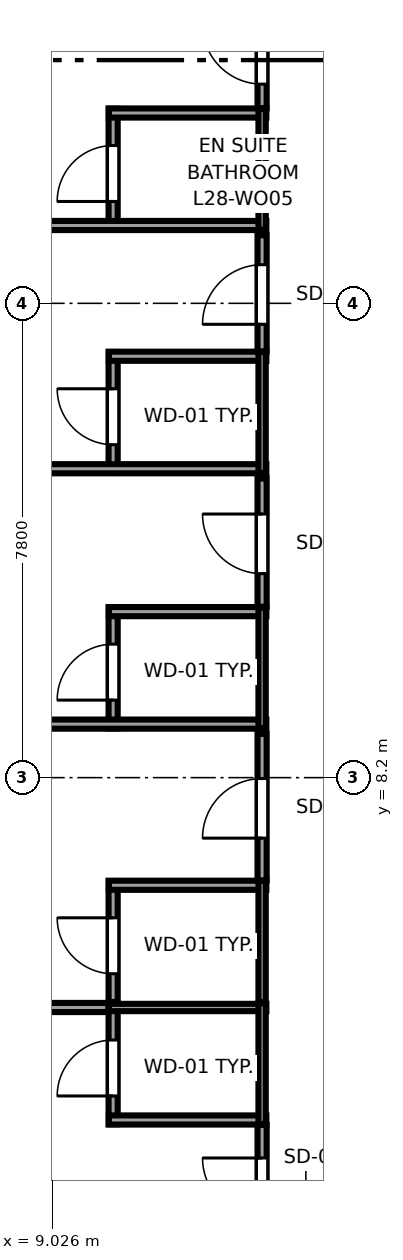
"""IFC4 building model, lengths in metres.
Left out: names, types, materials, properties, quantities, classifications, styles, units other than length and angle.
Written with IfcOpenShell. Run it as: python <this file> out.ifc"""

import sys

from ifc_helpers import new_model, si_unit, direction, frame, frame_2d, origin, place, context, subcontext, project, spatial, rectangle, extrude, source, transform, mapped, element, fill, save


model = new_model("IFC4")
c1 = context("Model", 3, precision=1e-05, world=origin(), true_north=direction((0.0, 1.0)))
c2 = subcontext(c1, "Body", "Model", "MODEL_VIEW")
j1 = project(units=[si_unit("LENGTHUNIT", "METRE"), si_unit("PLANEANGLEUNIT", "RADIAN")], contexts=[c1])
p1 = place(None, origin())
s1 = spatial("IfcSite", under=j1, at=p1, CompositionType="ELEMENT")
p2 = place(p1, origin())
s2 = spatial("IfcBuilding", under=s1, at=p2, CompositionType="ELEMENT")
p3 = place(p2, frame((0.0, 0.0, 111.55)))
s3 = spatial("IfcBuildingStorey", under=s2, at=p3, CompositionType="ELEMENT", Elevation=111.55)
p4 = place(p3, frame((10.03, 2.5, 0.0), z_axis=(0.0, 0.0, 1.0), x_axis=(0.0, 1.0, 0.0)))
e1 = element("IfcWall", 1, at=p4, inside=s3, PredefinedType="PARTITIONING", context=c2, shape_type="SweptSolid", body=[
    extrude(rectangle(XDim=1.99, YDim=0.15, at=frame_2d((0.995, 0.0))), origin(), (0.0, 0.0, 1.0), 3.37),
])
p5 = place(p4, frame((0.465, 0.0, 0.0)))
e2 = element("IfcOpeningElement", 2, at=p5, cuts=e1, PredefinedType="OPENING", context=c2, shape_type="SweptSolid", body=[
    extrude(rectangle(XDim=0.92, YDim=2.01, at=frame_2d((0.46, 1.005))), frame((0.0, 0.085, 0.0), z_axis=(0.0, -1.0, 0.0), x_axis=(1.0, 0.0, 0.0)), (0.0, 0.0, 1.0), 0.17),
])
p6 = place(p3, frame((9.96, 2.57, 0.0), z_axis=(0.0, 0.0, 1.0), x_axis=(1.0, 0.0, 0.0)))
e3 = element("IfcWall", 3, at=p6, inside=s3, PredefinedType="PARTITIONING", context=c2, shape_type="SweptSolid", body=[
    extrude(rectangle(XDim=2.59, YDim=0.15, at=frame_2d((1.295, 0.0))), origin(), (0.0, 0.0, 1.0), 3.37),
])
p7 = place(p3, frame((9.96, 4.42, 0.0), z_axis=(0.0, 0.0, 1.0), x_axis=(1.0, 0.0, 0.0)))
e4 = element("IfcWall", 4, at=p7, inside=s3, PredefinedType="PLUMBINGWALL", context=c2, shape_type="SweptSolid", body=[
    extrude(rectangle(XDim=2.59, YDim=0.12, at=frame_2d((1.295, 0.0))), origin(), (0.0, 0.0, 1.0), 3.37),
])
p8 = place(p3, frame((12.48, 2.5, 0.0), z_axis=(0.0, 0.0, 1.0), x_axis=(0.0, 1.0, 0.0)))
e5 = element("IfcWall", 5, at=p8, inside=s3, PredefinedType="PLUMBINGWALL", context=c2, shape_type="SweptSolid", body=[
    extrude(rectangle(XDim=1.99, YDim=0.12, at=frame_2d((0.995, 0.0))), origin(), (0.0, 0.0, 1.0), 3.37),
])
p9 = place(p3, frame((10.03, 4.51, 0.0), z_axis=(0.0, 0.0, 1.0), x_axis=(0.0, 1.0, 0.0)))
e6 = element("IfcWall", 6, at=p9, inside=s3, PredefinedType="PARTITIONING", context=c2, shape_type="SweptSolid", body=[
    extrude(rectangle(XDim=1.99, YDim=0.15, at=frame_2d((0.995, 0.0))), origin(), (0.0, 0.0, 1.0), 3.37),
])
p10 = place(p9, frame((0.465, 0.0, 0.0)))
e7 = element("IfcOpeningElement", 7, at=p10, cuts=e6, PredefinedType="OPENING", context=c2, shape_type="SweptSolid", body=[
    extrude(rectangle(XDim=0.92, YDim=2.01, at=frame_2d((0.46, 1.005))), frame((0.0, 0.085, 0.0), z_axis=(0.0, -1.0, 0.0), x_axis=(1.0, 0.0, 0.0)), (0.0, 0.0, 1.0), 0.17),
])
p11 = place(p3, frame((9.96, 6.43, 0.0), z_axis=(0.0, 0.0, 1.0), x_axis=(1.0, 0.0, 0.0)))
e8 = element("IfcWall", 8, at=p11, inside=s3, PredefinedType="PARTITIONING", context=c2, shape_type="SweptSolid", body=[
    extrude(rectangle(XDim=2.59, YDim=0.15, at=frame_2d((1.295, 0.0))), origin(), (0.0, 0.0, 1.0), 3.37),
])
p12 = place(p3, frame((12.48, 4.51, 0.0), z_axis=(0.0, 0.0, 1.0), x_axis=(0.0, 1.0, 0.0)))
e9 = element("IfcWall", 9, at=p12, inside=s3, PredefinedType="PLUMBINGWALL", context=c2, shape_type="SweptSolid", body=[
    extrude(rectangle(XDim=1.99, YDim=0.12, at=frame_2d((0.995, 0.0))), origin(), (0.0, 0.0, 1.0), 3.37),
])
p13 = place(p3, frame((10.03, 9.01, 0.0), z_axis=(0.0, 0.0, 1.0), x_axis=(0.0, 1.0, 0.0)))
e10 = element("IfcWall", 10, at=p13, inside=s3, PredefinedType="PARTITIONING", context=c2, shape_type="SweptSolid", body=[
    extrude(rectangle(XDim=1.99, YDim=0.15, at=frame_2d((0.995, 0.0))), origin(), (0.0, 0.0, 1.0), 3.37),
])
p14 = place(p13, frame((0.465, 0.0, 0.0)))
e11 = element("IfcOpeningElement", 11, at=p14, cuts=e10, PredefinedType="OPENING", context=c2, shape_type="SweptSolid", body=[
    extrude(rectangle(XDim=0.92, YDim=2.01, at=frame_2d((0.46, 1.005))), frame((0.0, 0.085, 0.0), z_axis=(0.0, -1.0, 0.0), x_axis=(1.0, 0.0, 0.0)), (0.0, 0.0, 1.0), 0.17),
])
p15 = place(p3, frame((0.405, 9.08, 0.0), z_axis=(0.0, 0.0, 1.0), x_axis=(1.0, 0.0, 0.0)))
e12 = element("IfcWall", 12, at=p15, inside=s3, PredefinedType="PARTITIONING", context=c2, shape_type="SweptSolid", body=[
    extrude(rectangle(XDim=12.145, YDim=0.15, at=frame_2d((6.073, 0.0))), origin(), (0.0, 0.0, 1.0), 3.37),
])
p16 = place(p3, frame((9.96, 10.93, 0.0), z_axis=(0.0, 0.0, 1.0), x_axis=(1.0, 0.0, 0.0)))
e13 = element("IfcWall", 13, at=p16, inside=s3, PredefinedType="PARTITIONING", context=c2, shape_type="SweptSolid", body=[
    extrude(rectangle(XDim=2.59, YDim=0.15, at=frame_2d((1.295, 0.0))), origin(), (0.0, 0.0, 1.0), 3.37),
])
p17 = place(p3, frame((12.48, 9.01, 0.0), z_axis=(0.0, 0.0, 1.0), x_axis=(0.0, 1.0, 0.0)))
e14 = element("IfcWall", 14, at=p17, inside=s3, PredefinedType="PLUMBINGWALL", context=c2, shape_type="SweptSolid", body=[
    extrude(rectangle(XDim=1.99, YDim=0.12, at=frame_2d((0.995, 0.0))), origin(), (0.0, 0.0, 1.0), 3.37),
])
p18 = place(p3, frame((10.03, 13.21, 0.0), z_axis=(0.0, 0.0, 1.0), x_axis=(0.0, 1.0, 0.0)))
e15 = element("IfcWall", 15, at=p18, inside=s3, PredefinedType="PARTITIONING", context=c2, shape_type="SweptSolid", body=[
    extrude(rectangle(XDim=1.99, YDim=0.15, at=frame_2d((0.995, 0.0))), origin(), (0.0, 0.0, 1.0), 3.37),
])
p19 = place(p18, frame((0.465, 0.0, 0.0)))
e16 = element("IfcOpeningElement", 16, at=p19, cuts=e15, PredefinedType="OPENING", context=c2, shape_type="SweptSolid", body=[
    extrude(rectangle(XDim=0.92, YDim=2.01, at=frame_2d((0.46, 1.005))), frame((0.0, 0.085, 0.0), z_axis=(0.0, -1.0, 0.0), x_axis=(1.0, 0.0, 0.0)), (0.0, 0.0, 1.0), 0.17),
])
p20 = place(p3, frame((0.405, 13.28, 0.0), z_axis=(0.0, 0.0, 1.0), x_axis=(1.0, 0.0, 0.0)))
e17 = element("IfcWall", 17, at=p20, inside=s3, PredefinedType="PARTITIONING", context=c2, shape_type="SweptSolid", body=[
    extrude(rectangle(XDim=12.145, YDim=0.15, at=frame_2d((6.073, 0.0))), origin(), (0.0, 0.0, 1.0), 3.37),
])
p21 = place(p3, frame((9.96, 15.13, 0.0), z_axis=(0.0, 0.0, 1.0), x_axis=(1.0, 0.0, 0.0)))
e18 = element("IfcWall", 18, at=p21, inside=s3, PredefinedType="PARTITIONING", context=c2, shape_type="SweptSolid", body=[
    extrude(rectangle(XDim=2.59, YDim=0.15, at=frame_2d((1.295, 0.0))), origin(), (0.0, 0.0, 1.0), 3.37),
])
p22 = place(p3, frame((12.48, 13.21, 0.0), z_axis=(0.0, 0.0, 1.0), x_axis=(0.0, 1.0, 0.0)))
e19 = element("IfcWall", 19, at=p22, inside=s3, PredefinedType="PLUMBINGWALL", context=c2, shape_type="SweptSolid", body=[
    extrude(rectangle(XDim=1.99, YDim=0.12, at=frame_2d((0.995, 0.0))), origin(), (0.0, 0.0, 1.0), 3.37),
])
p23 = place(p3, frame((10.03, 17.21, 0.0), z_axis=(0.0, 0.0, 1.0), x_axis=(0.0, 1.0, 0.0)))
e20 = element("IfcWall", 20, at=p23, inside=s3, PredefinedType="PARTITIONING", context=c2, shape_type="SweptSolid", body=[
    extrude(rectangle(XDim=1.99, YDim=0.15, at=frame_2d((0.995, 0.0))), origin(), (0.0, 0.0, 1.0), 3.37),
])
p24 = place(p23, frame((0.465, 0.0, 0.0)))
e21 = element("IfcOpeningElement", 21, at=p24, cuts=e20, PredefinedType="OPENING", context=c2, shape_type="SweptSolid", body=[
    extrude(rectangle(XDim=0.92, YDim=2.01, at=frame_2d((0.46, 1.005))), frame((0.0, 0.085, 0.0), z_axis=(0.0, -1.0, 0.0), x_axis=(1.0, 0.0, 0.0)), (0.0, 0.0, 1.0), 0.17),
])
p25 = place(p3, frame((0.405, 17.28, 0.0), z_axis=(0.0, 0.0, 1.0), x_axis=(1.0, 0.0, 0.0)))
e22 = element("IfcWall", 22, at=p25, inside=s3, PredefinedType="PARTITIONING", context=c2, shape_type="SweptSolid", body=[
    extrude(rectangle(XDim=12.145, YDim=0.15, at=frame_2d((6.073, 0.0))), origin(), (0.0, 0.0, 1.0), 3.37),
])
p26 = place(p3, frame((9.96, 19.13, 0.0), z_axis=(0.0, 0.0, 1.0), x_axis=(1.0, 0.0, 0.0)))
e23 = element("IfcWall", 23, at=p26, inside=s3, PredefinedType="PARTITIONING", context=c2, shape_type="SweptSolid", body=[
    extrude(rectangle(XDim=2.59, YDim=0.15, at=frame_2d((1.295, 0.0))), origin(), (0.0, 0.0, 1.0), 3.37),
])
p27 = place(p3, frame((12.48, 17.21, 0.0), z_axis=(0.0, 0.0, 1.0), x_axis=(0.0, 1.0, 0.0)))
e24 = element("IfcWall", 24, at=p27, inside=s3, PredefinedType="PLUMBINGWALL", context=c2, shape_type="SweptSolid", body=[
    extrude(rectangle(XDim=1.99, YDim=0.12, at=frame_2d((0.995, 0.0))), origin(), (0.0, 0.0, 1.0), 3.37),
])
p28 = place(p3, frame((12.48, 0.405, 0.0), z_axis=(0.0, 0.0, 1.0), x_axis=(0.0, 1.0, 0.0)))
e25 = element("IfcWall", 25, at=p28, inside=s3, PredefinedType="PARTITIONING", context=c2, shape_type="SweptSolid", body=[
    extrude(rectangle(XDim=2.085, YDim=0.15, at=frame_2d((1.042, 0.0))), origin(), (0.0, 0.0, 1.0), 3.37),
])
p29 = place(p28, frame((0.56, 0.0, 0.0)))
e26 = element("IfcOpeningElement", 26, at=p29, cuts=e25, PredefinedType="OPENING", context=c2, shape_type="SweptSolid", body=[
    extrude(rectangle(XDim=0.98, YDim=2.12, at=frame_2d((0.49, 1.06))), frame((0.0, 0.085, 0.0), z_axis=(0.0, -1.0, 0.0), x_axis=(1.0, 0.0, 0.0)), (0.0, 0.0, 1.0), 0.17),
])
p30 = place(p3, frame((0.417, 4.42, 0.0), z_axis=(0.0, 0.0, 1.0), x_axis=(1.0, 0.0, 0.0)))
e27 = element("IfcWall", 27, at=p30, inside=s3, PredefinedType="PARTITIONING", context=c2, shape_type="SweptSolid", body=[
    extrude(rectangle(XDim=9.533, YDim=0.15, at=frame_2d((4.767, 0.0))), origin(), (0.0, 0.0, 1.0), 3.37),
])
p31 = place(p3, frame((12.48, 6.51, 0.0), z_axis=(0.0, 0.0, 1.0), x_axis=(0.0, 1.0, 0.0)))
e28 = element("IfcWall", 28, at=p31, inside=s3, PredefinedType="PARTITIONING", context=c2, shape_type="SweptSolid", body=[
    extrude(rectangle(XDim=2.41, YDim=0.15, at=frame_2d((1.205, 0.0))), origin(), (0.0, 0.0, 1.0), 3.37),
])
p32 = place(p31, frame((0.695, 0.0, 0.0)))
e29 = element("IfcOpeningElement", 29, at=p32, cuts=e28, PredefinedType="OPENING", context=c2, shape_type="SweptSolid", body=[
    extrude(rectangle(XDim=0.98, YDim=2.12, at=frame_2d((0.49, 1.06))), frame((0.0, 0.085, 0.0), z_axis=(0.0, -1.0, 0.0), x_axis=(1.0, 0.0, 0.0)), (0.0, 0.0, 1.0), 0.17),
])
p33 = place(p3, frame((12.48, 11.01, 0.0), z_axis=(0.0, 0.0, 1.0), x_axis=(0.0, 1.0, 0.0)))
e30 = element("IfcWall", 30, at=p33, inside=s3, PredefinedType="PARTITIONING", context=c2, shape_type="SweptSolid", body=[
    extrude(rectangle(XDim=2.11, YDim=0.15, at=frame_2d((1.055, 0.0))), origin(), (0.0, 0.0, 1.0), 3.37),
])
p34 = place(p33, frame((0.545, 0.0, 0.0)))
e31 = element("IfcOpeningElement", 31, at=p34, cuts=e30, PredefinedType="OPENING", context=c2, shape_type="SweptSolid", body=[
    extrude(rectangle(XDim=0.98, YDim=2.12, at=frame_2d((0.49, 1.06))), frame((0.0, 0.085, 0.0), z_axis=(0.0, -1.0, 0.0), x_axis=(1.0, 0.0, 0.0)), (0.0, 0.0, 1.0), 0.17),
])
p35 = place(p3, frame((12.48, 15.21, 0.0), z_axis=(0.0, 0.0, 1.0), x_axis=(0.0, 1.0, 0.0)))
e32 = element("IfcWall", 32, at=p35, inside=s3, PredefinedType="PARTITIONING", context=c2, shape_type="SweptSolid", body=[
    extrude(rectangle(XDim=1.91, YDim=0.15, at=frame_2d((0.955, 0.0))), origin(), (0.0, 0.0, 1.0), 3.37),
])
p36 = place(p35, frame((0.445, 0.0, 0.0)))
e33 = element("IfcOpeningElement", 33, at=p36, cuts=e32, PredefinedType="OPENING", context=c2, shape_type="SweptSolid", body=[
    extrude(rectangle(XDim=0.98, YDim=2.12, at=frame_2d((0.49, 1.06))), frame((0.0, 0.085, 0.0), z_axis=(0.0, -1.0, 0.0), x_axis=(1.0, 0.0, 0.0)), (0.0, 0.0, 1.0), 0.17),
])
p37 = place(p3, frame((12.48, 19.21, 0.0), z_axis=(0.0, 0.0, 1.0), x_axis=(0.0, 1.0, 0.0)))
e34 = element("IfcWall", 34, at=p37, inside=s3, PredefinedType="PARTITIONING", context=c2, shape_type="SweptSolid", body=[
    extrude(rectangle(XDim=1.81, YDim=0.15, at=frame_2d((0.905, 0.0))), origin(), (0.0, 0.0, 1.0), 3.37),
])
p38 = place(p37, frame((0.395, 0.0, 0.0)))
e35 = element("IfcOpeningElement", 35, at=p38, cuts=e34, PredefinedType="OPENING", context=c2, shape_type="SweptSolid", body=[
    extrude(rectangle(XDim=0.98, YDim=2.12, at=frame_2d((0.49, 1.06))), frame((0.0, 0.085, 0.0), z_axis=(0.0, -1.0, 0.0), x_axis=(1.0, 0.0, 0.0)), (0.0, 0.0, 1.0), 0.17),
])
m1 = source(origin(), c2, "Body", "SweptSolid", [
    extrude(rectangle(XDim=0.92, YDim=2.01, at=frame_2d((0.46, 1.005))), frame((0.0, 0.025, 0.0), z_axis=(0.0, -1.0, 0.0), x_axis=(1.0, 0.0, 0.0)), (0.0, 0.0, 1.0), 0.05),
])
p39 = place(p5, origin())
e36 = element("IfcDoor", 36, at=p39, inside=s3, OperationType="SINGLE_SWING_LEFT", PredefinedType="DOOR", context=c2, shape_type="MappedRepresentation", body=[
    mapped(m1, transform((0.0, 0.0, 0.0), x_axis=(1.0, 0.0, 0.0), y_axis=(0.0, 1.0, 0.0), z_axis=(0.0, 0.0, 1.0), scale=1.0)),
])
fill(e2, e36)
p40 = place(p10, origin())
e37 = element("IfcDoor", 37, at=p40, inside=s3, OperationType="SINGLE_SWING_RIGHT", PredefinedType="DOOR", context=c2, shape_type="MappedRepresentation", body=[
    mapped(m1, transform((0.0, 0.0, 0.0), x_axis=(1.0, 0.0, 0.0), y_axis=(0.0, 1.0, 0.0), z_axis=(0.0, 0.0, 1.0), scale=1.0)),
])
fill(e7, e37)
p41 = place(p14, origin())
e38 = element("IfcDoor", 38, at=p41, inside=s3, OperationType="SINGLE_SWING_LEFT", PredefinedType="DOOR", context=c2, shape_type="MappedRepresentation", body=[
    mapped(m1, transform((0.0, 0.0, 0.0), x_axis=(1.0, 0.0, 0.0), y_axis=(0.0, 1.0, 0.0), z_axis=(0.0, 0.0, 1.0), scale=1.0)),
])
fill(e11, e38)
p42 = place(p19, origin())
e39 = element("IfcDoor", 39, at=p42, inside=s3, OperationType="SINGLE_SWING_RIGHT", PredefinedType="DOOR", context=c2, shape_type="MappedRepresentation", body=[
    mapped(m1, transform((0.0, 0.0, 0.0), x_axis=(1.0, 0.0, 0.0), y_axis=(0.0, 1.0, 0.0), z_axis=(0.0, 0.0, 1.0), scale=1.0)),
])
fill(e16, e39)
p43 = place(p24, origin())
e40 = element("IfcDoor", 40, at=p43, inside=s3, OperationType="SINGLE_SWING_LEFT", PredefinedType="DOOR", context=c2, shape_type="MappedRepresentation", body=[
    mapped(m1, transform((0.0, 0.0, 0.0), x_axis=(1.0, 0.0, 0.0), y_axis=(0.0, 1.0, 0.0), z_axis=(0.0, 0.0, 1.0), scale=1.0)),
])
fill(e21, e40)
m2 = source(origin(), c2, "Body", "SweptSolid", [
    extrude(rectangle(XDim=0.98, YDim=2.12, at=frame_2d((0.49, 1.06))), frame((0.0, 0.025, 0.0), z_axis=(0.0, -1.0, 0.0), x_axis=(1.0, 0.0, 0.0)), (0.0, 0.0, 1.0), 0.05),
])
p44 = place(p29, origin())
e41 = element("IfcDoor", 41, at=p44, inside=s3, OperationType="SINGLE_SWING_RIGHT", PredefinedType="DOOR", context=c2, shape_type="MappedRepresentation", body=[
    mapped(m2, transform((0.0, 0.0, 0.0), x_axis=(1.0, 0.0, 0.0), y_axis=(0.0, 1.0, 0.0), z_axis=(0.0, 0.0, 1.0), scale=1.0)),
])
fill(e26, e41)
p45 = place(p32, origin())
e42 = element("IfcDoor", 42, at=p45, inside=s3, OperationType="SINGLE_SWING_LEFT", PredefinedType="DOOR", context=c2, shape_type="MappedRepresentation", body=[
    mapped(m2, transform((0.0, 0.0, 0.0), x_axis=(1.0, 0.0, 0.0), y_axis=(0.0, 1.0, 0.0), z_axis=(0.0, 0.0, 1.0), scale=1.0)),
])
fill(e29, e42)
p46 = place(p34, origin())
e43 = element("IfcDoor", 43, at=p46, inside=s3, OperationType="SINGLE_SWING_RIGHT", PredefinedType="DOOR", context=c2, shape_type="MappedRepresentation", body=[
    mapped(m2, transform((0.0, 0.0, 0.0), x_axis=(1.0, 0.0, 0.0), y_axis=(0.0, 1.0, 0.0), z_axis=(0.0, 0.0, 1.0), scale=1.0)),
])
fill(e31, e43)
p47 = place(p36, origin())
e44 = element("IfcDoor", 44, at=p47, inside=s3, OperationType="SINGLE_SWING_LEFT", PredefinedType="DOOR", context=c2, shape_type="MappedRepresentation", body=[
    mapped(m2, transform((0.0, 0.0, 0.0), x_axis=(1.0, 0.0, 0.0), y_axis=(0.0, 1.0, 0.0), z_axis=(0.0, 0.0, 1.0), scale=1.0)),
])
fill(e33, e44)
p48 = place(p38, origin())
e45 = element("IfcDoor", 45, at=p48, inside=s3, OperationType="SINGLE_SWING_RIGHT", PredefinedType="DOOR", context=c2, shape_type="MappedRepresentation", body=[
    mapped(m2, transform((0.0, 0.0, 0.0), x_axis=(1.0, 0.0, 0.0), y_axis=(0.0, 1.0, 0.0), z_axis=(0.0, 0.0, 1.0), scale=1.0)),
])
fill(e35, e45)
save(model, sys.argv[1])
